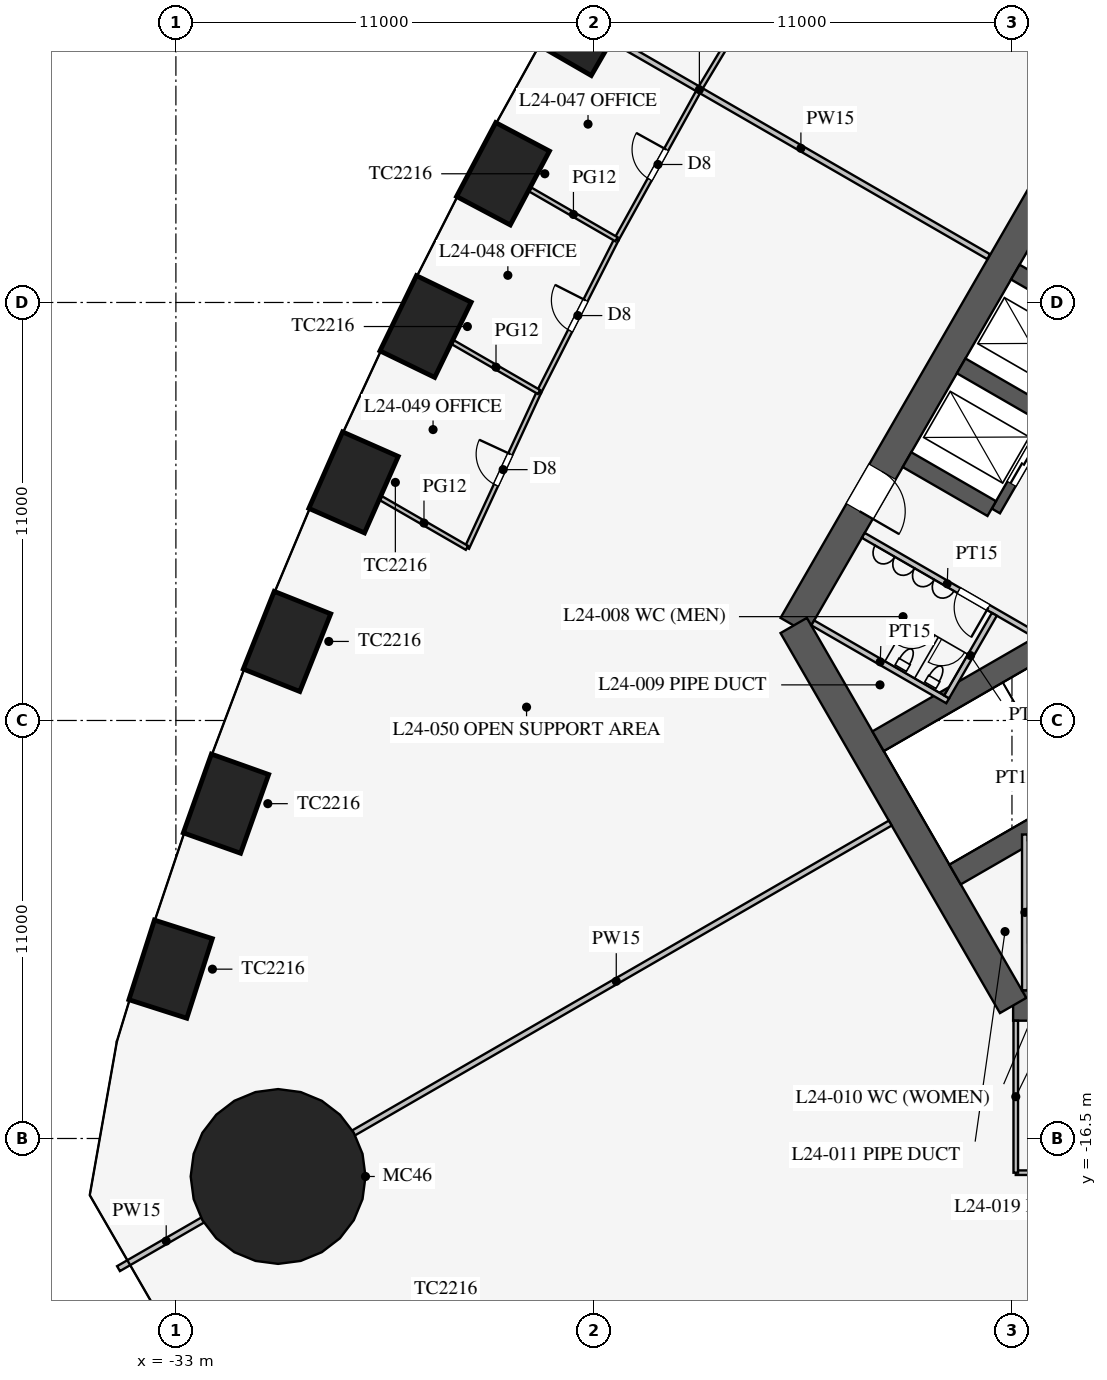
"""IFC4 building model, lengths in metres.
Left out: names, types, materials, properties, quantities, classifications, styles, units other than length and angle.
Written with IfcOpenShell. Run it as: python <this file> out.ifc"""

import sys

from ifc_helpers import new_model, si_unit, direction, frame, frame_2d, origin, origin_2d, place, context, subcontext, project, spatial, rectangle, circle, extrude, element, fill, save


model = new_model("IFC4")
c1 = context("Model", 3, precision=1e-05, world=origin(), true_north=direction((0.0, 1.0)))
c2 = subcontext(c1, "Body", "Model", "MODEL_VIEW")
j1 = project(units=[si_unit("LENGTHUNIT", "METRE"), si_unit("PLANEANGLEUNIT", "RADIAN")], contexts=[c1])
p1 = place(None, origin())
s1 = spatial("IfcSite", under=j1, at=p1, CompositionType="ELEMENT")
p2 = place(p1, origin())
s2 = spatial("IfcBuilding", under=s1, at=p2, CompositionType="ELEMENT")
p3 = place(p2, frame((0.0, 0.0, 107.3)))
s3 = spatial("IfcBuildingStorey", under=s2, at=p3, CompositionType="ELEMENT", Elevation=107.3)
for number, where, z_axis, x_axis in (
    (1, (-22.213, 12.825, 0.0), (0.0, 0.0, 1.0), (-0.5, -0.866, 0.0)),
    (2, (-24.393, 8.887, 0.0), (0.0, 0.0, 1.0), (-0.468, -0.883, 0.0)),
    (3, (-26.43, 4.867, 0.0), (0.0, 0.0, 1.0), (-0.436, -0.9, 0.0)),
    (4, (-28.325, 0.765, 0.0), (0.0, 0.0, 1.0), (-0.403, -0.915, 0.0)),
    (5, (-30.077, -3.42, 0.0), (0.0, 0.0, 1.0), (-0.37, -0.929, 0.0)),
    (6, (-31.682, -7.689, 0.0), (0.0, 0.0, 1.0), (-0.336, -0.942, 0.0)),
    (7, (-33.139, -12.044, 0.0), (0.0, 0.0, 1.0), (-0.305, -0.952, 0.0)),
):
    element("IfcColumn", number, at=place(p3, frame(where, z_axis=z_axis, x_axis=x_axis)), inside=s3, PredefinedType="COLUMN", context=c2, shape_type="SweptSolid", body=[
        extrude(rectangle(XDim=2.2, YDim=1.6, at=origin_2d()), origin(), (0.0, 0.0, 1.0), 4.2),
    ])
p4 = place(p3, frame((-30.311, -17.5, 0.0), z_axis=(0.0, 0.0, 1.0), x_axis=(1.0, 0.0, 0.0)))
e8 = element("IfcColumn", 8, at=p4, inside=s3, PredefinedType="COLUMN", context=c2, shape_type="SweptSolid", body=[
    extrude(circle(Radius=2.3, at=origin_2d()), origin(), (0.0, 0.0, 1.0), 4.2),
])
p5 = place(p3, frame((-10.97, -13.0, 0.0), z_axis=(0.0, 0.0, 1.0), x_axis=(1.0, 0.0, 0.0)))
e9 = element("IfcWall", 9, at=p5, inside=s3, PredefinedType="SHEAR", context=c2, shape_type="SweptSolid", body=[
    extrude(rectangle(XDim=21.939, YDim=0.8, at=frame_2d((10.97, 0.0))), origin(), (0.0, 0.0, 1.0), 4.2),
])
p6 = place(p5, frame((17.27, 0.0, 0.0)))
e10 = element("IfcOpeningElement", 10, at=p6, cuts=e9, PredefinedType="OPENING", context=c2, shape_type="SweptSolid", body=[
    extrude(rectangle(XDim=1.2, YDim=2.1, at=frame_2d((0.6, 1.05))), frame((0.0, 0.41, 0.0), z_axis=(0.0, -1.0, 0.0), x_axis=(1.0, 0.0, 0.0)), (0.0, 0.0, 1.0), 0.82),
])
p7 = place(p5, frame((3.47, 0.0, 0.0)))
e11 = element("IfcOpeningElement", 11, at=p7, cuts=e9, PredefinedType="OPENING", context=c2, shape_type="SweptSolid", body=[
    extrude(rectangle(XDim=1.2, YDim=2.1, at=frame_2d((0.6, 1.05))), frame((0.0, 0.41, 0.0), z_axis=(0.0, -1.0, 0.0), x_axis=(1.0, 0.0, 0.0)), (0.0, 0.0, 1.0), 0.82),
])
p8 = place(p3, frame((-5.773, 16.0, 0.0), z_axis=(0.0, 0.0, 1.0), x_axis=(-0.500002442456, -0.866023993627, 0.0)))
e12 = element("IfcWall", 12, at=p8, inside=s3, PredefinedType="SHEAR", context=c2, shape_type="SweptSolid", body=[
    extrude(rectangle(XDim=21.939, YDim=0.8, at=frame_2d((10.97, 0.0))), origin(), (0.0, 0.0, 1.0), 4.2),
])
p9 = place(p8, frame((17.27, 0.0, 0.0)))
e13 = element("IfcOpeningElement", 13, at=p9, cuts=e12, PredefinedType="OPENING", context=c2, shape_type="SweptSolid", body=[
    extrude(rectangle(XDim=1.2, YDim=2.1, at=frame_2d((0.6, 1.05))), frame((0.0, 0.41, 0.0), z_axis=(0.0, -1.0, 0.0), x_axis=(1.0, 0.0, 0.0)), (0.0, 0.0, 1.0), 0.82),
])
p10 = place(p8, frame((3.47, 0.0, 0.0)))
e14 = element("IfcOpeningElement", 14, at=p10, cuts=e12, PredefinedType="OPENING", context=c2, shape_type="SweptSolid", body=[
    extrude(rectangle(XDim=1.2, YDim=2.1, at=frame_2d((0.6, 1.05))), frame((0.0, 0.41, 0.0), z_axis=(0.0, -1.0, 0.0), x_axis=(1.0, 0.0, 0.0)), (0.0, 0.0, 1.0), 0.82),
])
p11 = place(p3, frame((-16.743, -3.0, 0.0), z_axis=(0.0, 0.0, 1.0), x_axis=(0.499995765644, -0.866027848477, 0.0)))
e15 = element("IfcWall", 15, at=p11, inside=s3, PredefinedType="SHEAR", context=c2, shape_type="SweptSolid", body=[
    extrude(rectangle(XDim=11.547, YDim=0.8, at=frame_2d((5.773, 0.0))), origin(), (0.0, 0.0, 1.0), 4.2),
])
p12 = place(p3, frame((-5.724, 9.886, 0.0), z_axis=(0.0, 0.0, 1.0), x_axis=(-0.500001763848, -0.866024385424, 0.0)))
e16 = element("IfcWall", 16, at=p12, inside=s3, PredefinedType="SHEAR", context=c2, shape_type="SweptSolid", body=[
    extrude(rectangle(XDim=11.4, YDim=0.25, at=frame_2d((5.7, 0.0))), origin(), (0.0, 0.0, 1.0), 4.2),
])
p13 = place(p12, frame((6.525, 0.0, 0.0)))
e17 = element("IfcOpeningElement", 17, at=p13, cuts=e16, PredefinedType="OPENING", context=c2, shape_type="SweptSolid", body=[
    extrude(rectangle(XDim=1.2, YDim=2.2, at=frame_2d((0.6, 1.1))), frame((0.0, 0.135, 0.0), z_axis=(0.0, -1.0, 0.0), x_axis=(1.0, 0.0, 0.0)), (0.0, 0.0, 1.0), 0.27),
])
p14 = place(p12, frame((9.375, 0.0, 0.0)))
e18 = element("IfcOpeningElement", 18, at=p14, cuts=e16, PredefinedType="OPENING", context=c2, shape_type="SweptSolid", body=[
    extrude(rectangle(XDim=1.2, YDim=2.2, at=frame_2d((0.6, 1.1))), frame((0.0, 0.135, 0.0), z_axis=(0.0, -1.0, 0.0), x_axis=(1.0, 0.0, 0.0)), (0.0, 0.0, 1.0), 0.27),
])
for number, where, z_axis, x_axis in (
    (19, (-8.682, 5.012, 0.0), (0.0, 0.0, 1.0), (-0.866, 0.5, 0.0)),
    (20, (-10.107, 2.544, 0.0), (0.0, 0.0, 1.0), (-0.866, 0.5, 0.0)),
    (21, (-11.532, 0.076, 0.0), (0.0, 0.0, 1.0), (-0.866, 0.5, 0.0)),
):
    element("IfcWall", number, at=place(p3, frame(where, z_axis=z_axis, x_axis=x_axis)), inside=s3, PredefinedType="SHEAR", context=c2, shape_type="SweptSolid", body=[
        extrude(rectangle(XDim=2.575, YDim=0.45, at=frame_2d((1.288, 0.0))), origin(), (0.0, 0.0, 1.0), 4.2),
    ])
for number, where, z_axis, x_axis in (
    (22, (-6.663, -1.509, 0.0), (0.0, 0.0, 1.0), (-0.866, -0.5, 0.0)),
    (23, (-4.638, -5.016, 0.0), (0.0, 0.0, 1.0), (-0.866, -0.5, 0.0)),
):
    element("IfcWall", number, at=place(p3, frame(where, z_axis=z_axis, x_axis=x_axis)), inside=s3, PredefinedType="SHEAR", context=c2, shape_type="SweptSolid", body=[
        extrude(rectangle(XDim=9.075, YDim=0.6, at=frame_2d((4.538, 0.0))), origin(), (0.0, 0.0, 1.0), 4.2),
    ])
p15 = place(p3, frame((-10.495, -3.178, 0.0), z_axis=(0.0, 0.0, 1.0), x_axis=(-0.86602216432, 0.500005610874, 0.0)))
e24 = element("IfcWall", 24, at=p15, inside=s3, PredefinedType="PARTITIONING", context=c2, shape_type="SweptSolid", body=[
    extrude(rectangle(XDim=5.1, YDim=0.15, at=frame_2d((2.55, 0.0))), origin(), (0.0, 0.0, 1.0), 4.0),
])
p16 = place(p15, frame((1.3, 0.0, 0.0)))
e25 = element("IfcOpeningElement", 25, at=p16, cuts=e24, PredefinedType="OPENING", context=c2, shape_type="SweptSolid", body=[
    extrude(rectangle(XDim=0.9, YDim=2.1, at=frame_2d((0.45, 1.05))), frame((0.0, 0.085, 0.0), z_axis=(0.0, -1.0, 0.0), x_axis=(1.0, 0.0, 0.0)), (0.0, 0.0, 1.0), 0.17),
])
p17 = place(p3, frame((-12.691, -4.982, 0.0), z_axis=(0.0, 0.0, 1.0), x_axis=(-0.8660249478, 0.500000789788, 0.0)))
e26 = element("IfcWall", 26, at=p17, inside=s3, PredefinedType="PARTITIONING", context=c2, shape_type="SweptSolid", body=[
    extrude(rectangle(XDim=4.1, YDim=0.15, at=frame_2d((2.05, 0.0))), origin(), (0.0, 0.0, 1.0), 4.0),
])
p18 = place(p3, frame((-11.464, -2.706, 0.0), z_axis=(0.0, 0.0, 1.0), x_axis=(-0.50001992892, -0.866013897511, 0.0)))
e27 = element("IfcWall", 27, at=p18, inside=s3, PredefinedType="PARTITIONING", context=c2, shape_type="SweptSolid", body=[
    extrude(rectangle(XDim=2.51, YDim=0.15, at=frame_2d((1.255, 0.0))), origin(), (0.0, 0.0, 1.0), 4.0),
])
p19 = place(p3, frame((-10.66, -8.5, 0.0), z_axis=(0.0, 0.0, 1.0), x_axis=(0.0, -1.0, 0.0)))
e28 = element("IfcWall", 28, at=p19, inside=s3, PredefinedType="PARTITIONING", context=c2, shape_type="SweptSolid", body=[
    extrude(rectangle(XDim=4.1, YDim=0.15, at=frame_2d((2.05, 0.0))), origin(), (0.0, 0.0, 1.0), 4.0),
])
p20 = place(p3, frame((-14.203, -8.2, 0.0), z_axis=(0.0, 0.0, 1.0), x_axis=(-0.866024668836, -0.500001272966, 0.0)))
e29 = element("IfcWall", 29, at=p20, inside=s3, PredefinedType="PARTITIONING", context=c2, shape_type="SweptSolid", body=[
    extrude(rectangle(XDim=16.65, YDim=0.15, at=frame_2d((8.325, 0.0))), origin(), (0.0, 0.0, 1.0), 2.3),
])
p21 = place(p3, frame((-32.0, -18.475, 0.0), z_axis=(0.0, 0.0, 1.0), x_axis=(-0.866042548026, -0.499970304126, 0.0)))
e30 = element("IfcWall", 30, at=p21, inside=s3, PredefinedType="PARTITIONING", context=c2, shape_type="SweptSolid", body=[
    extrude(rectangle(XDim=2.899, YDim=0.15, at=frame_2d((1.45, 0.0))), origin(), (0.0, 0.0, 1.0), 2.3),
])
p22 = place(p3, frame((-10.9, -17.4, 0.0), z_axis=(0.0, 0.0, 1.0), x_axis=(1.0, 0.0, 0.0)))
e31 = element("IfcWall", 31, at=p22, inside=s3, PredefinedType="PARTITIONING", context=c2, shape_type="SweptSolid", body=[
    extrude(rectangle(XDim=2.4, YDim=0.12, at=frame_2d((1.2, 0.0))), origin(), (0.0, 0.0, 1.0), 2.9),
])
p23 = place(p22, frame((0.6, 0.0, 0.15)))
e32 = element("IfcOpeningElement", 32, at=p23, cuts=e31, PredefinedType="OPENING", context=c2, shape_type="SweptSolid", body=[
    extrude(rectangle(XDim=1.0, YDim=2.1, at=frame_2d((0.5, 1.05))), frame((0.0, 0.07, 0.0), z_axis=(0.0, -1.0, 0.0), x_axis=(1.0, 0.0, 0.0)), (0.0, 0.0, 1.0), 0.14),
])
p24 = place(p3, frame((-10.9, -13.4, 0.0), z_axis=(0.0, 0.0, 1.0), x_axis=(0.0, -1.0, 0.0)))
e33 = element("IfcWall", 33, at=p24, inside=s3, PredefinedType="PARTITIONING", context=c2, shape_type="SweptSolid", body=[
    extrude(rectangle(XDim=4.0, YDim=0.12, at=frame_2d((2.0, 0.0))), origin(), (0.0, 0.0, 1.0), 2.9),
])
p25 = place(p3, frame((-11.613, 6.705, 0.0), z_axis=(0.0, 0.0, 1.0), x_axis=(-0.866026306654, 0.499998436182, 0.0)))
e34 = element("IfcWall", 34, at=p25, inside=s3, PredefinedType="PARTITIONING", context=c2, shape_type="SweptSolid", body=[
    extrude(rectangle(XDim=11.41, YDim=0.15, at=frame_2d((5.705, 0.0))), origin(), (0.0, 0.0, 1.0), 2.8),
])
p26 = place(p3, frame((-19.226, 11.1, 0.0), z_axis=(0.0, 0.0, 1.0), x_axis=(-0.484292898211, -0.874905931368, 0.0)))
e35 = element("IfcWall", 35, at=p26, inside=s3, PredefinedType="PARTITIONING", context=c2, shape_type="SweptSolid", body=[
    extrude(rectangle(XDim=4.501, YDim=0.12, at=frame_2d((2.25, 0.0))), origin(), (0.0, 0.0, 1.0), 2.9),
])
p27 = place(p26, frame((1.8, 0.0, 0.15)))
e36 = element("IfcOpeningElement", 36, at=p27, cuts=e35, PredefinedType="OPENING", context=c2, shape_type="SweptSolid", body=[
    extrude(rectangle(XDim=0.9, YDim=2.1, at=frame_2d((0.45, 1.05))), frame((0.0, 0.07, 0.0), z_axis=(0.0, -1.0, 0.0), x_axis=(1.0, 0.0, 0.0)), (0.0, 0.0, 1.0), 0.14),
])
p28 = place(p3, frame((-21.405, 7.162, 0.0), z_axis=(0.0, 0.0, 1.0), x_axis=(-0.452471679136, -0.891778772779, 0.0)))
e37 = element("IfcWall", 37, at=p28, inside=s3, PredefinedType="PARTITIONING", context=c2, shape_type="SweptSolid", body=[
    extrude(rectangle(XDim=4.507, YDim=0.12, at=frame_2d((2.253, 0.0))), origin(), (0.0, 0.0, 1.0), 2.9),
])
p29 = place(p28, frame((1.8, 0.0, 0.15)))
e38 = element("IfcOpeningElement", 38, at=p29, cuts=e37, PredefinedType="OPENING", context=c2, shape_type="SweptSolid", body=[
    extrude(rectangle(XDim=0.9, YDim=2.1, at=frame_2d((0.45, 1.05))), frame((0.0, 0.07, 0.0), z_axis=(0.0, -1.0, 0.0), x_axis=(1.0, 0.0, 0.0)), (0.0, 0.0, 1.0), 0.14),
])
p30 = place(p3, frame((-23.444, 3.143, 0.0), z_axis=(0.0, 0.0, 1.0), x_axis=(-0.419883773418, -0.907577884713, 0.0)))
e39 = element("IfcWall", 39, at=p30, inside=s3, PredefinedType="PARTITIONING", context=c2, shape_type="SweptSolid", body=[
    extrude(rectangle(XDim=4.519, YDim=0.12, at=frame_2d((2.259, 0.0))), origin(), (0.0, 0.0, 1.0), 2.9),
])
p31 = place(p30, frame((1.8, 0.0, 0.15)))
e40 = element("IfcOpeningElement", 40, at=p31, cuts=e39, PredefinedType="OPENING", context=c2, shape_type="SweptSolid", body=[
    extrude(rectangle(XDim=0.9, YDim=2.1, at=frame_2d((0.45, 1.05))), frame((0.0, 0.07, 0.0), z_axis=(0.0, -1.0, 0.0), x_axis=(1.0, 0.0, 0.0)), (0.0, 0.0, 1.0), 0.14),
])
p32 = place(p3, frame((-16.905, 14.956, 0.0), z_axis=(0.0, 0.0, 1.0), x_axis=(-0.515548366618, -0.856860479703, 0.0)))
e41 = element("IfcWall", 41, at=p32, inside=s3, PredefinedType="PARTITIONING", context=c2, shape_type="SweptSolid", body=[
    extrude(rectangle(XDim=4.501, YDim=0.12, at=frame_2d((2.25, 0.0))), origin(), (0.0, 0.0, 1.0), 2.9),
])
p33 = place(p32, frame((1.8, 0.0, 0.15)))
e42 = element("IfcOpeningElement", 42, at=p33, cuts=e41, PredefinedType="OPENING", context=c2, shape_type="SweptSolid", body=[
    extrude(rectangle(XDim=0.9, YDim=2.1, at=frame_2d((0.45, 1.05))), frame((0.0, 0.07, 0.0), z_axis=(0.0, -1.0, 0.0), x_axis=(1.0, 0.0, 0.0)), (0.0, 0.0, 1.0), 0.14),
])
p34 = place(p3, frame((-25.342, -0.958, 0.0), z_axis=(0.0, 0.0, 1.0), x_axis=(-0.866036074319, 0.499981517636, 0.0)))
e43 = element("IfcWall", 43, at=p34, inside=s3, PredefinedType="PARTITIONING", context=c2, shape_type="SweptSolid", body=[
    extrude(rectangle(XDim=2.61, YDim=0.12, at=frame_2d((1.305, 0.0))), origin(), (0.0, 0.0, 1.0), 2.6),
])
p35 = place(p3, frame((-21.405, 7.162, 0.0), z_axis=(0.0, 0.0, 1.0), x_axis=(-0.866008611403, 0.50002908413, 0.0)))
e44 = element("IfcWall", 44, at=p35, inside=s3, PredefinedType="PARTITIONING", context=c2, shape_type="SweptSolid", body=[
    extrude(rectangle(XDim=2.619, YDim=0.12, at=frame_2d((1.31, 0.0))), origin(), (0.0, 0.0, 1.0), 2.8),
])
p36 = place(p3, frame((-23.444, 3.143, 0.0), z_axis=(0.0, 0.0, 1.0), x_axis=(-0.866011491631, 0.500024095782, 0.0)))
e45 = element("IfcWall", 45, at=p36, inside=s3, PredefinedType="PARTITIONING", context=c2, shape_type="SweptSolid", body=[
    extrude(rectangle(XDim=2.615, YDim=0.12, at=frame_2d((1.308, 0.0))), origin(), (0.0, 0.0, 1.0), 2.9),
])
p37 = place(p16, origin())
e46 = element("IfcDoor", 46, at=p37, inside=s3, OperationType="SINGLE_SWING_LEFT", PredefinedType="DOOR", context=c2, shape_type="SweptSolid", body=[
    extrude(rectangle(XDim=0.9, YDim=2.1, at=frame_2d((0.45, 1.05))), frame((0.0, 0.025, 0.0), z_axis=(0.0, -1.0, 0.0), x_axis=(1.0, 0.0, 0.0)), (0.0, 0.0, 1.0), 0.05),
])
fill(e25, e46)
p38 = place(p9, origin())
e47 = element("IfcDoor", 47, at=p38, inside=s3, OperationType="SINGLE_SWING_RIGHT", PredefinedType="DOOR", context=c2, shape_type="SweptSolid", body=[
    extrude(rectangle(XDim=1.2, YDim=2.1, at=frame_2d((0.6, 1.05))), frame((0.0, 0.025, 0.0), z_axis=(0.0, -1.0, 0.0), x_axis=(1.0, 0.0, 0.0)), (0.0, 0.0, 1.0), 0.05),
])
fill(e13, e47)
p39 = place(p27, frame((0.9, 0.0, 0.0), z_axis=(0.0, 0.0, 1.0), x_axis=(-1.0, 0.0, 0.0)))
e48 = element("IfcDoor", 48, at=p39, inside=s3, OperationType="SINGLE_SWING_RIGHT", PredefinedType="DOOR", context=c2, shape_type="SweptSolid", body=[
    extrude(rectangle(XDim=0.9, YDim=2.1, at=frame_2d((0.45, 1.05))), frame((0.0, 0.025, 0.0), z_axis=(0.0, -1.0, 0.0), x_axis=(1.0, 0.0, 0.0)), (0.0, 0.0, 1.0), 0.05),
])
fill(e36, e48)
p40 = place(p29, frame((0.9, 0.0, 0.0), z_axis=(0.0, 0.0, 1.0), x_axis=(-1.0, 0.0, 0.0)))
e49 = element("IfcDoor", 49, at=p40, inside=s3, OperationType="SINGLE_SWING_RIGHT", PredefinedType="DOOR", context=c2, shape_type="SweptSolid", body=[
    extrude(rectangle(XDim=0.9, YDim=2.1, at=frame_2d((0.45, 1.05))), frame((0.0, 0.025, 0.0), z_axis=(0.0, -1.0, 0.0), x_axis=(1.0, 0.0, 0.0)), (0.0, 0.0, 1.0), 0.05),
])
fill(e38, e49)
p41 = place(p31, frame((0.9, 0.0, 0.0), z_axis=(0.0, 0.0, 1.0), x_axis=(-1.0, 0.0, 0.0)))
e50 = element("IfcDoor", 50, at=p41, inside=s3, OperationType="SINGLE_SWING_RIGHT", PredefinedType="DOOR", context=c2, shape_type="SweptSolid", body=[
    extrude(rectangle(XDim=0.9, YDim=2.1, at=frame_2d((0.45, 1.05))), frame((0.0, 0.025, 0.0), z_axis=(0.0, -1.0, 0.0), x_axis=(1.0, 0.0, 0.0)), (0.0, 0.0, 1.0), 0.05),
])
fill(e40, e50)
p42 = place(p14, origin())
e51 = element("IfcDoor", 51, at=p42, inside=s3, OperationType="DOUBLE_DOOR_SLIDING", PredefinedType="DOOR", context=c2, shape_type="SweptSolid", body=[
    extrude(rectangle(XDim=1.2, YDim=2.2, at=frame_2d((0.6, 1.1))), frame((0.0, 0.025, 0.0), z_axis=(0.0, -1.0, 0.0), x_axis=(1.0, 0.0, 0.0)), (0.0, 0.0, 1.0), 0.05),
])
fill(e18, e51)
save(model, sys.argv[1])
